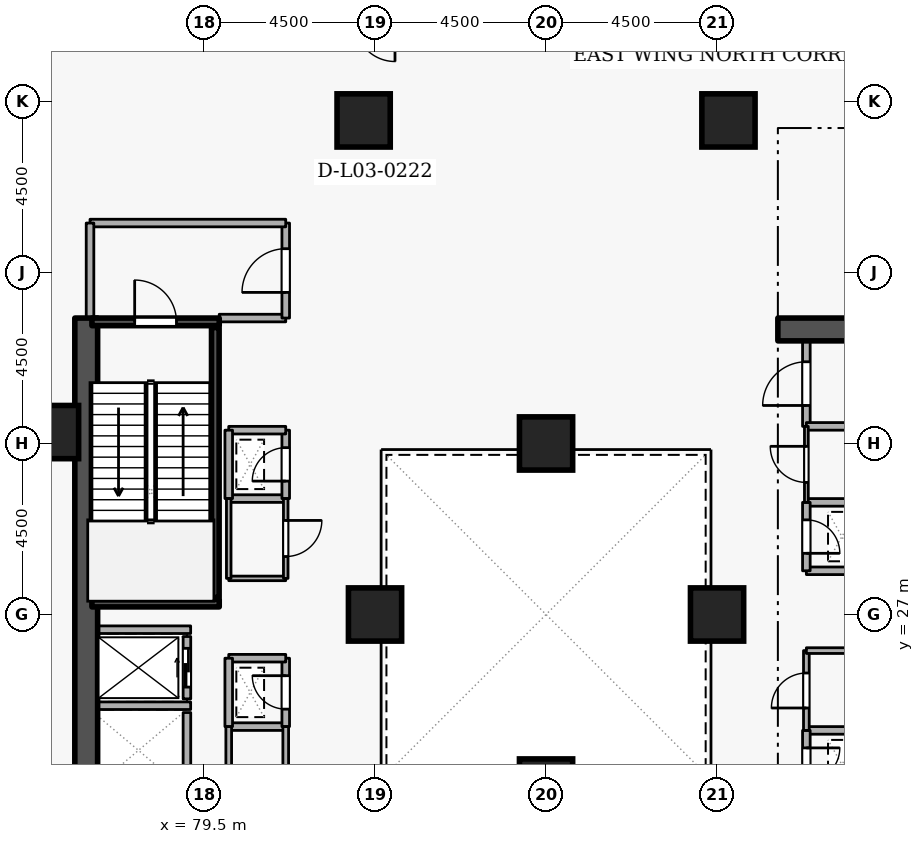
"""IFC4 building model, lengths in metres.
Left out: names, types, materials, properties, quantities, classifications, styles, units other than length and angle.
Written with IfcOpenShell. Run it as: python <this file> out.ifc"""

import sys

from ifc_helpers import new_model, si_unit, direction, frame, frame_2d, origin, origin_2d, place, context, subcontext, project, spatial, rectangle, extrude, element, fill, save


model = new_model("IFC4")
c1 = context("Model", 3, precision=1e-05, world=origin(), true_north=direction((0.0, 1.0)))
c2 = subcontext(c1, "Body", "Model", "MODEL_VIEW")
j1 = project(units=[si_unit("LENGTHUNIT", "METRE"), si_unit("PLANEANGLEUNIT", "RADIAN")], contexts=[c1])
p1 = place(None, origin())
s1 = spatial("IfcSite", under=j1, at=p1, CompositionType="ELEMENT")
p2 = place(p1, origin())
s2 = spatial("IfcBuilding", under=s1, at=p2, CompositionType="ELEMENT")
p3 = place(p2, frame((0.0, 0.0, 14.1)))
s3 = spatial("IfcBuildingStorey", under=s2, at=p3, CompositionType="ELEMENT", Elevation=14.1)
p4 = place(p3, frame((94.6, 34.5, 0.0), z_axis=(0.0, 0.0, 1.0), x_axis=(1.0, 0.0, 0.0)))
e1 = element("IfcWall", 1, at=p4, inside=s3, PredefinedType="SHEAR", context=c2, shape_type="SweptSolid", body=[
    extrude(rectangle(XDim=5.7, YDim=0.6, at=frame_2d((2.85, 0.0))), origin(), (0.0, 0.0, 1.0), 4.5),
])
p5 = place(p3, frame((76.4, 19.2, 0.0), z_axis=(0.0, 0.0, 1.0), x_axis=(0.0, 1.0, 0.0)))
e2 = element("IfcWall", 2, at=p5, inside=s3, PredefinedType="SHEAR", context=c2, shape_type="SweptSolid", body=[
    extrude(rectangle(XDim=15.6, YDim=0.6, at=frame_2d((7.8, 0.0))), origin(), (0.0, 0.0, 1.0), 4.5),
])
for number, where, z_axis, x_axis in (
    (3, (93.3, 40.0, 0.0), (0.0, 0.0, 1.0), (1.0, 0.0, 0.0)),
    (4, (83.7, 40.0, 0.0), (0.0, 0.0, 1.0), (1.0, 0.0, 0.0)),
    (5, (75.5, 31.8, 0.0), (0.0, 0.0, 1.0), (1.0, 0.0, 0.0)),
    (6, (93.0, 27.0, 0.0), (0.0, 0.0, 1.0), (1.0, 0.0, 0.0)),
    (7, (84.0, 27.0, 0.0), (0.0, 0.0, 1.0), (1.0, 0.0, 0.0)),
    (8, (88.5, 22.5, 0.0), (0.0, 0.0, 1.0), (1.0, 0.0, 0.0)),
    (9, (88.5, 31.5, 0.0), (0.0, 0.0, 1.0), (1.0, 0.0, 0.0)),
):
    element("IfcColumn", number, at=place(p3, frame(where, z_axis=z_axis, x_axis=x_axis)), inside=s3, PredefinedType="COLUMN", context=c2, shape_type="SweptSolid", body=[
        extrude(rectangle(XDim=1.4, YDim=1.4, at=origin_2d()), origin(), (0.0, 0.0, 1.0), 4.5),
    ])
p6 = place(p3, frame((79.05, 24.78, 0.0), z_axis=(0.0, 0.0, 1.0), x_axis=(0.0, 1.0, 0.0)))
e10 = element("IfcWall", 10, at=p6, inside=s3, PredefinedType="STANDARD", context=c2, shape_type="SweptSolid", body=[
    extrude(rectangle(XDim=1.64, YDim=0.2, at=frame_2d((0.82, 0.0))), origin(), (0.0, 0.0, 1.0), 4.16),
])
p7 = place(p6, frame((0.31, 0.0, 0.0)))
e11 = element("IfcOpeningElement", 11, at=p7, cuts=e10, PredefinedType="OPENING", context=c2, shape_type="SweptSolid", body=[
    extrude(rectangle(XDim=1.02, YDim=2.06, at=frame_2d((0.51, 1.03))), frame((0.0, 0.11, 0.0), z_axis=(0.0, -1.0, 0.0), x_axis=(1.0, 0.0, 0.0)), (0.0, 0.0, 1.0), 0.22),
])
p8 = place(p3, frame((79.05, 22.43, 0.0), z_axis=(0.0, 0.0, 1.0), x_axis=(0.0, 1.0, 0.0)))
e12 = element("IfcWall", 12, at=p8, inside=s3, PredefinedType="STANDARD", context=c2, shape_type="SweptSolid", body=[
    extrude(rectangle(XDim=1.99, YDim=0.2, at=frame_2d((0.995, 0.0))), origin(), (0.0, 0.0, 1.0), 4.16),
])
for number, where, z_axis, x_axis in (
    (13, (76.712, 26.6, 0.0), (0.0, 0.0, 1.0), (1.0, 0.0, 0.0)),
    (14, (76.712, 24.6, 0.0), (0.0, 0.0, 1.0), (1.0, 0.0, 0.0)),
):
    element("IfcWall", number, at=place(p3, frame(where, z_axis=z_axis, x_axis=x_axis)), inside=s3, PredefinedType="STANDARD", context=c2, shape_type="SweptSolid", body=[
        extrude(rectangle(XDim=2.436, YDim=0.2, at=frame_2d((1.218, 0.0))), origin(), (0.0, 0.0, 1.0), 4.16),
    ])
p9 = place(p3, frame((76.55, 34.7, 0.0), z_axis=(0.0, 0.0, 1.0), x_axis=(1.0, 0.0, 0.0)))
e15 = element("IfcWall", 15, at=p9, inside=s3, PredefinedType="SHEAR", context=c2, shape_type="SweptSolid", body=[
    extrude(rectangle(XDim=3.35, YDim=0.2, at=frame_2d((1.675, 0.0))), origin(), (0.0, 0.0, 1.0), 4.5),
])
p10 = place(p9, frame((1.125, 0.0, 0.0)))
e16 = element("IfcOpeningElement", 16, at=p10, cuts=e15, PredefinedType="OPENING", context=c2, shape_type="SweptSolid", body=[
    extrude(rectangle(XDim=1.1, YDim=2.1, at=frame_2d((0.55, 1.05))), frame((0.0, 0.11, 0.0), z_axis=(0.0, -1.0, 0.0), x_axis=(1.0, 0.0, 0.0)), (0.0, 0.0, 1.0), 0.22),
])
p11 = place(p3, frame((79.9, 27.3, 0.0), z_axis=(0.0, 0.0, 1.0), x_axis=(-1.0, 0.0, 0.0)))
e17 = element("IfcWall", 17, at=p11, inside=s3, PredefinedType="SHEAR", context=c2, shape_type="SweptSolid", body=[
    extrude(rectangle(XDim=3.35, YDim=0.2, at=frame_2d((1.675, 0.0))), origin(), (0.0, 0.0, 1.0), 4.5),
])
p12 = place(p3, frame((79.797, 27.45, 0.0), z_axis=(0.0, 0.0, 1.0), x_axis=(0.0, 1.0, 0.0)))
e18 = element("IfcWall", 18, at=p12, inside=s3, PredefinedType="SHEAR", context=c2, shape_type="SweptSolid", body=[
    extrude(rectangle(XDim=7.1, YDim=0.2, at=frame_2d((3.55, 0.0))), origin(), (0.0, 0.0, 1.0), 4.5),
])
p13 = place(p3, frame((79.9, 34.8, 0.0), z_axis=(0.0, 0.0, 1.0), x_axis=(1.0, 0.0, 0.0)))
e19 = element("IfcWall", 19, at=p13, inside=s3, PredefinedType="STANDARD", context=c2, shape_type="SweptSolid", body=[
    extrude(rectangle(XDim=1.75, YDim=0.2, at=frame_2d((0.875, 0.0))), origin(), (0.0, 0.0, 1.0), 3.365),
])
p14 = place(p3, frame((81.65, 34.8, 0.0), z_axis=(0.0, 0.0, 1.0), x_axis=(0.0, 1.0, 0.0)))
e20 = element("IfcWall", 20, at=p14, inside=s3, PredefinedType="STANDARD", context=c2, shape_type="SweptSolid", body=[
    extrude(rectangle(XDim=2.5, YDim=0.2, at=frame_2d((1.25, 0.0))), origin(), (0.0, 0.0, 1.0), 4.16),
])
p15 = place(p14, frame((0.675, 0.0, 0.0)))
e21 = element("IfcOpeningElement", 21, at=p15, cuts=e20, PredefinedType="OPENING", context=c2, shape_type="SweptSolid", body=[
    extrude(rectangle(XDim=1.15, YDim=2.1, at=frame_2d((0.575, 1.05))), frame((0.0, 0.11, 0.0), z_axis=(0.0, -1.0, 0.0), x_axis=(1.0, 0.0, 0.0)), (0.0, 0.0, 1.0), 0.22),
])
p16 = place(p3, frame((81.65, 37.3, 0.0), z_axis=(0.0, 0.0, 1.0), x_axis=(-1.0, 0.0, 0.0)))
e22 = element("IfcWall", 22, at=p16, inside=s3, PredefinedType="STANDARD", context=c2, shape_type="SweptSolid", body=[
    extrude(rectangle(XDim=5.15, YDim=0.2, at=frame_2d((2.575, 0.0))), origin(), (0.0, 0.0, 1.0), 4.16),
])
p17 = place(p3, frame((76.5, 37.3, 0.0), z_axis=(0.0, 0.0, 1.0), x_axis=(0.0, -1.0, 0.0)))
e23 = element("IfcWall", 23, at=p17, inside=s3, PredefinedType="STANDARD", context=c2, shape_type="SweptSolid", body=[
    extrude(rectangle(XDim=2.5, YDim=0.2, at=frame_2d((1.25, 0.0))), origin(), (0.0, 0.0, 1.0), 4.16),
])
for number, where, z_axis, x_axis in (
    (24, (95.35, 28.15, 0.0), (0.0, 0.0, 1.0), (1.0, 0.0, 0.0)),
    (25, (96.85, 29.95, 0.0), (0.0, 0.0, 1.0), (-1.0, 0.0, 0.0)),
):
    element("IfcWall", number, at=place(p3, frame(where, z_axis=z_axis, x_axis=x_axis)), inside=s3, PredefinedType="STANDARD", context=c2, shape_type="SweptSolid", body=[
        extrude(rectangle(XDim=1.5, YDim=0.2, at=frame_2d((0.75, 0.0))), origin(), (0.0, 0.0, 1.0), 4.16),
    ])
p18 = place(p3, frame((95.35, 29.95, 0.0), z_axis=(0.0, 0.0, 1.0), x_axis=(0.0, -1.0, 0.0)))
e26 = element("IfcWall", 26, at=p18, inside=s3, PredefinedType="STANDARD", context=c2, shape_type="SweptSolid", body=[
    extrude(rectangle(XDim=1.8, YDim=0.2, at=frame_2d((0.9, 0.0))), origin(), (0.0, 0.0, 1.0), 4.16),
])
p19 = place(p18, frame((0.46, 0.0, 0.0)))
e27 = element("IfcOpeningElement", 27, at=p19, cuts=e26, PredefinedType="OPENING", context=c2, shape_type="SweptSolid", body=[
    extrude(rectangle(XDim=0.88, YDim=2.04, at=frame_2d((0.44, 1.02))), frame((0.0, 0.11, 0.0), z_axis=(0.0, -1.0, 0.0), x_axis=(1.0, 0.0, 0.0)), (0.0, 0.0, 1.0), 0.22),
])
p20 = place(p3, frame((96.85, 23.95, 0.0), z_axis=(0.0, 0.0, 1.0), x_axis=(-1.0, 0.0, 0.0)))
e28 = element("IfcWall", 28, at=p20, inside=s3, PredefinedType="STANDARD", context=c2, shape_type="SweptSolid", body=[
    extrude(rectangle(XDim=1.5, YDim=0.2, at=frame_2d((0.75, 0.0))), origin(), (0.0, 0.0, 1.0), 4.16),
])
p21 = place(p3, frame((95.35, 23.95, 0.0), z_axis=(0.0, 0.0, 1.0), x_axis=(0.0, -1.0, 0.0)))
e29 = element("IfcWall", 29, at=p21, inside=s3, PredefinedType="STANDARD", context=c2, shape_type="SweptSolid", body=[
    extrude(rectangle(XDim=1.8, YDim=0.2, at=frame_2d((0.9, 0.0))), origin(), (0.0, 0.0, 1.0), 4.16),
])
p22 = place(p21, frame((0.46, 0.0, 0.0)))
e30 = element("IfcOpeningElement", 30, at=p22, cuts=e29, PredefinedType="OPENING", context=c2, shape_type="SweptSolid", body=[
    extrude(rectangle(XDim=0.88, YDim=2.04, at=frame_2d((0.44, 1.02))), frame((0.0, 0.11, 0.0), z_axis=(0.0, -1.0, 0.0), x_axis=(1.0, 0.0, 0.0)), (0.0, 0.0, 1.0), 0.22),
])
p23 = place(p3, frame((80.15, 24.05, 0.0), z_axis=(0.0, 0.0, 1.0), x_axis=(1.0, 0.0, 0.0)))
e31 = element("IfcWall", 31, at=p23, inside=s3, PredefinedType="STANDARD", context=c2, shape_type="SweptSolid", body=[
    extrude(rectangle(XDim=1.5, YDim=0.2, at=frame_2d((0.75, 0.0))), origin(), (0.0, 0.0, 1.0), 4.16),
])
p24 = place(p3, frame((81.65, 24.05, 0.0), z_axis=(0.0, 0.0, 1.0), x_axis=(0.0, 1.0, 0.0)))
e32 = element("IfcWall", 32, at=p24, inside=s3, PredefinedType="STANDARD", context=c2, shape_type="SweptSolid", body=[
    extrude(rectangle(XDim=1.8, YDim=0.2, at=frame_2d((0.9, 0.0))), origin(), (0.0, 0.0, 1.0), 4.16),
])
p25 = place(p24, frame((0.46, 0.0, 0.0)))
e33 = element("IfcOpeningElement", 33, at=p25, cuts=e32, PredefinedType="OPENING", context=c2, shape_type="SweptSolid", body=[
    extrude(rectangle(XDim=0.88, YDim=2.04, at=frame_2d((0.44, 1.02))), frame((0.0, 0.11, 0.0), z_axis=(0.0, -1.0, 0.0), x_axis=(1.0, 0.0, 0.0)), (0.0, 0.0, 1.0), 0.22),
])
p26 = place(p3, frame((81.65, 25.85, 0.0), z_axis=(0.0, 0.0, 1.0), x_axis=(-1.0, 0.0, 0.0)))
e34 = element("IfcWall", 34, at=p26, inside=s3, PredefinedType="STANDARD", context=c2, shape_type="SweptSolid", body=[
    extrude(rectangle(XDim=1.5, YDim=0.2, at=frame_2d((0.75, 0.0))), origin(), (0.0, 0.0, 1.0), 4.16),
])
p27 = place(p3, frame((80.15, 25.85, 0.0), z_axis=(0.0, 0.0, 1.0), x_axis=(0.0, -1.0, 0.0)))
e35 = element("IfcWall", 35, at=p27, inside=s3, PredefinedType="STANDARD", context=c2, shape_type="SweptSolid", body=[
    extrude(rectangle(XDim=1.8, YDim=0.2, at=frame_2d((0.9, 0.0))), origin(), (0.0, 0.0, 1.0), 4.16),
])
p28 = place(p3, frame((80.15, 30.05, 0.0), z_axis=(0.0, 0.0, 1.0), x_axis=(1.0, 0.0, 0.0)))
e36 = element("IfcWall", 36, at=p28, inside=s3, PredefinedType="STANDARD", context=c2, shape_type="SweptSolid", body=[
    extrude(rectangle(XDim=1.5, YDim=0.2, at=frame_2d((0.75, 0.0))), origin(), (0.0, 0.0, 1.0), 4.16),
])
p29 = place(p3, frame((81.65, 30.05, 0.0), z_axis=(0.0, 0.0, 1.0), x_axis=(0.0, 1.0, 0.0)))
e37 = element("IfcWall", 37, at=p29, inside=s3, PredefinedType="STANDARD", context=c2, shape_type="SweptSolid", body=[
    extrude(rectangle(XDim=1.8, YDim=0.2, at=frame_2d((0.9, 0.0))), origin(), (0.0, 0.0, 1.0), 4.16),
])
p30 = place(p29, frame((0.46, 0.0, 0.0)))
e38 = element("IfcOpeningElement", 38, at=p30, cuts=e37, PredefinedType="OPENING", context=c2, shape_type="SweptSolid", body=[
    extrude(rectangle(XDim=0.88, YDim=2.04, at=frame_2d((0.44, 1.02))), frame((0.0, 0.11, 0.0), z_axis=(0.0, -1.0, 0.0), x_axis=(1.0, 0.0, 0.0)), (0.0, 0.0, 1.0), 0.22),
])
p31 = place(p3, frame((81.65, 31.85, 0.0), z_axis=(0.0, 0.0, 1.0), x_axis=(-1.0, 0.0, 0.0)))
e39 = element("IfcWall", 39, at=p31, inside=s3, PredefinedType="STANDARD", context=c2, shape_type="SweptSolid", body=[
    extrude(rectangle(XDim=1.5, YDim=0.2, at=frame_2d((0.75, 0.0))), origin(), (0.0, 0.0, 1.0), 4.16),
])
p32 = place(p3, frame((80.15, 31.85, 0.0), z_axis=(0.0, 0.0, 1.0), x_axis=(0.0, -1.0, 0.0)))
e40 = element("IfcWall", 40, at=p32, inside=s3, PredefinedType="STANDARD", context=c2, shape_type="SweptSolid", body=[
    extrude(rectangle(XDim=1.8, YDim=0.2, at=frame_2d((0.9, 0.0))), origin(), (0.0, 0.0, 1.0), 4.16),
])
p33 = place(p3, frame((95.35, 31.95, 0.0), z_axis=(0.0, 0.0, 1.0), x_axis=(0.0, 1.0, 0.0)))
e41 = element("IfcWall", 41, at=p33, inside=s3, PredefinedType="STANDARD", context=c2, shape_type="SweptSolid", body=[
    extrude(rectangle(XDim=2.25, YDim=0.2, at=frame_2d((1.125, 0.0))), origin(), (0.0, 0.0, 1.0), 4.16),
])
p34 = place(p33, frame((0.55, 0.0, 0.0)))
e42 = element("IfcOpeningElement", 42, at=p34, cuts=e41, PredefinedType="OPENING", context=c2, shape_type="SweptSolid", body=[
    extrude(rectangle(XDim=1.15, YDim=2.1, at=frame_2d((0.575, 1.05))), frame((0.0, 0.11, 0.0), z_axis=(0.0, -1.0, 0.0), x_axis=(1.0, 0.0, 0.0)), (0.0, 0.0, 1.0), 0.22),
])
p35 = place(p3, frame((96.85, 31.95, 0.0), z_axis=(0.0, 0.0, 1.0), x_axis=(-1.0, 0.0, 0.0)))
e43 = element("IfcWall", 43, at=p35, inside=s3, PredefinedType="STANDARD", context=c2, shape_type="SweptSolid", body=[
    extrude(rectangle(XDim=1.5, YDim=0.2, at=frame_2d((0.75, 0.0))), origin(), (0.0, 0.0, 1.0), 4.16),
])
p36 = place(p3, frame((95.35, 23.95, 0.0), z_axis=(0.0, 0.0, 1.0), x_axis=(0.0, 1.0, 0.0)))
e44 = element("IfcWall", 44, at=p36, inside=s3, PredefinedType="PARTITIONING", context=c2, shape_type="SweptSolid", body=[
    extrude(rectangle(XDim=2.1, YDim=0.15, at=frame_2d((1.05, 0.0))), origin(), (0.0, 0.0, 1.0), 4.16),
])
p37 = place(p36, frame((0.59, 0.0, 0.0)))
e45 = element("IfcOpeningElement", 45, at=p37, cuts=e44, PredefinedType="OPENING", context=c2, shape_type="SweptSolid", body=[
    extrude(rectangle(XDim=0.92, YDim=2.08, at=frame_2d((0.46, 1.04))), frame((0.0, 0.085, 0.0), z_axis=(0.0, -1.0, 0.0), x_axis=(1.0, 0.0, 0.0)), (0.0, 0.0, 1.0), 0.17),
])
p38 = place(p3, frame((95.35, 26.05, 0.0), z_axis=(0.0, 0.0, 1.0), x_axis=(1.0, 0.0, 0.0)))
e46 = element("IfcWall", 46, at=p38, inside=s3, PredefinedType="PARTITIONING", context=c2, shape_type="SweptSolid", body=[
    extrude(rectangle(XDim=1.5, YDim=0.15, at=frame_2d((0.75, 0.0))), origin(), (0.0, 0.0, 1.0), 4.16),
])
p39 = place(p3, frame((95.35, 29.95, 0.0), z_axis=(0.0, 0.0, 1.0), x_axis=(0.0, 1.0, 0.0)))
e47 = element("IfcWall", 47, at=p39, inside=s3, PredefinedType="PARTITIONING", context=c2, shape_type="SweptSolid", body=[
    extrude(rectangle(XDim=2.0, YDim=0.1, at=frame_2d((1.0, 0.0))), origin(), (0.0, 0.0, 1.0), 4.16),
])
p40 = place(p39, frame((0.525, 0.0, 0.0)))
e48 = element("IfcOpeningElement", 48, at=p40, cuts=e47, PredefinedType="OPENING", context=c2, shape_type="SweptSolid", body=[
    extrude(rectangle(XDim=0.95, YDim=2.1, at=frame_2d((0.475, 1.05))), frame((0.0, 0.06, 0.0), z_axis=(0.0, -1.0, 0.0), x_axis=(1.0, 0.0, 0.0)), (0.0, 0.0, 1.0), 0.12),
])
p41 = place(p3, frame((80.15, 19.8, 0.0), z_axis=(0.0, 0.0, 1.0), x_axis=(0.0, 1.0, 0.0)))
e49 = element("IfcWall", 49, at=p41, inside=s3, PredefinedType="PARTITIONING", context=c2, shape_type="SweptSolid", body=[
    extrude(rectangle(XDim=4.25, YDim=0.15, at=frame_2d((2.125, 0.0))), origin(), (0.0, 0.0, 1.0), 4.16),
])
p42 = place(p3, frame((81.65, 24.05, 0.0), z_axis=(0.0, 0.0, 1.0), x_axis=(0.0, -1.0, 0.0)))
e50 = element("IfcWall", 50, at=p42, inside=s3, PredefinedType="PARTITIONING", context=c2, shape_type="SweptSolid", body=[
    extrude(rectangle(XDim=4.25, YDim=0.15, at=frame_2d((2.125, 0.0))), origin(), (0.0, 0.0, 1.0), 4.16),
])
p43 = place(p42, frame((1.665, 0.0, 0.0)))
e51 = element("IfcOpeningElement", 51, at=p43, cuts=e50, PredefinedType="OPENING", context=c2, shape_type="SweptSolid", body=[
    extrude(rectangle(XDim=0.92, YDim=2.08, at=frame_2d((0.46, 1.04))), frame((0.0, 0.085, 0.0), z_axis=(0.0, -1.0, 0.0), x_axis=(1.0, 0.0, 0.0)), (0.0, 0.0, 1.0), 0.17),
])
p44 = place(p3, frame((81.65, 27.95, 0.0), z_axis=(0.0, 0.0, 1.0), x_axis=(-1.0, 0.0, 0.0)))
e52 = element("IfcWall", 52, at=p44, inside=s3, PredefinedType="PARTITIONING", context=c2, shape_type="SweptSolid", body=[
    extrude(rectangle(XDim=1.5, YDim=0.12, at=frame_2d((0.75, 0.0))), origin(), (0.0, 0.0, 1.0), 4.16),
])
p45 = place(p3, frame((80.15, 27.95, 0.0), z_axis=(0.0, 0.0, 1.0), x_axis=(0.0, 1.0, 0.0)))
e53 = element("IfcWall", 53, at=p45, inside=s3, PredefinedType="PARTITIONING", context=c2, shape_type="SweptSolid", body=[
    extrude(rectangle(XDim=2.1, YDim=0.12, at=frame_2d((1.05, 0.0))), origin(), (0.0, 0.0, 1.0), 4.16),
])
p46 = place(p3, frame((81.65, 30.05, 0.0), z_axis=(0.0, 0.0, 1.0), x_axis=(0.0, -1.0, 0.0)))
e54 = element("IfcWall", 54, at=p46, inside=s3, PredefinedType="PARTITIONING", context=c2, shape_type="SweptSolid", body=[
    extrude(rectangle(XDim=2.1, YDim=0.12, at=frame_2d((1.05, 0.0))), origin(), (0.0, 0.0, 1.0), 4.16),
])
p47 = place(p46, frame((0.575, 0.0, 0.0)))
e55 = element("IfcOpeningElement", 55, at=p47, cuts=e54, PredefinedType="OPENING", context=c2, shape_type="SweptSolid", body=[
    extrude(rectangle(XDim=0.95, YDim=2.1, at=frame_2d((0.475, 1.05))), frame((0.0, 0.07, 0.0), z_axis=(0.0, -1.0, 0.0), x_axis=(1.0, 0.0, 0.0)), (0.0, 0.0, 1.0), 0.14),
])
p48 = place(p7, origin())
e56 = element("IfcDoor", 56, at=p48, inside=s3, OperationType="SLIDING_TO_LEFT", PredefinedType="DOOR", context=c2, shape_type="SweptSolid", body=[
    extrude(rectangle(XDim=1.02, YDim=2.06, at=frame_2d((0.51, 1.03))), frame((0.0, 0.025, 0.0), z_axis=(0.0, -1.0, 0.0), x_axis=(1.0, 0.0, 0.0)), (0.0, 0.0, 1.0), 0.05),
])
fill(e11, e56)
p49 = place(p10, origin())
e57 = element("IfcDoor", 57, at=p49, inside=s3, OperationType="SINGLE_SWING_LEFT", PredefinedType="DOOR", context=c2, shape_type="SweptSolid", body=[
    extrude(rectangle(XDim=1.1, YDim=2.1, at=frame_2d((0.55, 1.05))), frame((0.0, 0.025, 0.0), z_axis=(0.0, -1.0, 0.0), x_axis=(1.0, 0.0, 0.0)), (0.0, 0.0, 1.0), 0.05),
])
fill(e16, e57)
p50 = place(p15, origin())
e58 = element("IfcDoor", 58, at=p50, inside=s3, OperationType="SINGLE_SWING_LEFT", PredefinedType="DOOR", context=c2, shape_type="SweptSolid", body=[
    extrude(rectangle(XDim=1.15, YDim=2.1, at=frame_2d((0.575, 1.05))), frame((0.0, 0.025, 0.0), z_axis=(0.0, -1.0, 0.0), x_axis=(1.0, 0.0, 0.0)), (0.0, 0.0, 1.0), 0.05),
])
fill(e21, e58)
p51 = place(p19, origin())
e59 = element("IfcDoor", 59, at=p51, inside=s3, OperationType="SINGLE_SWING_RIGHT", PredefinedType="DOOR", context=c2, shape_type="SweptSolid", body=[
    extrude(rectangle(XDim=0.88, YDim=2.04, at=frame_2d((0.44, 1.02))), frame((0.0, 0.025, 0.0), z_axis=(0.0, -1.0, 0.0), x_axis=(1.0, 0.0, 0.0)), (0.0, 0.0, 1.0), 0.05),
])
fill(e27, e59)
p52 = place(p22, origin())
e60 = element("IfcDoor", 60, at=p52, inside=s3, OperationType="SINGLE_SWING_LEFT", PredefinedType="DOOR", context=c2, shape_type="SweptSolid", body=[
    extrude(rectangle(XDim=0.88, YDim=2.04, at=frame_2d((0.44, 1.02))), frame((0.0, 0.025, 0.0), z_axis=(0.0, -1.0, 0.0), x_axis=(1.0, 0.0, 0.0)), (0.0, 0.0, 1.0), 0.05),
])
fill(e30, e60)
p53 = place(p25, origin())
e61 = element("IfcDoor", 61, at=p53, inside=s3, OperationType="SINGLE_SWING_RIGHT", PredefinedType="DOOR", context=c2, shape_type="SweptSolid", body=[
    extrude(rectangle(XDim=0.88, YDim=2.04, at=frame_2d((0.44, 1.02))), frame((0.0, 0.025, 0.0), z_axis=(0.0, -1.0, 0.0), x_axis=(1.0, 0.0, 0.0)), (0.0, 0.0, 1.0), 0.05),
])
fill(e33, e61)
p54 = place(p30, origin())
e62 = element("IfcDoor", 62, at=p54, inside=s3, OperationType="SINGLE_SWING_LEFT", PredefinedType="DOOR", context=c2, shape_type="SweptSolid", body=[
    extrude(rectangle(XDim=0.88, YDim=2.04, at=frame_2d((0.44, 1.02))), frame((0.0, 0.025, 0.0), z_axis=(0.0, -1.0, 0.0), x_axis=(1.0, 0.0, 0.0)), (0.0, 0.0, 1.0), 0.05),
])
fill(e38, e62)
p55 = place(p37, origin())
e63 = element("IfcDoor", 63, at=p55, inside=s3, OperationType="SINGLE_SWING_LEFT", PredefinedType="DOOR", context=c2, shape_type="SweptSolid", body=[
    extrude(rectangle(XDim=0.92, YDim=2.08, at=frame_2d((0.46, 1.04))), frame((0.0, 0.025, 0.0), z_axis=(0.0, -1.0, 0.0), x_axis=(1.0, 0.0, 0.0)), (0.0, 0.0, 1.0), 0.05),
])
fill(e45, e63)
p56 = place(p40, origin())
e64 = element("IfcDoor", 64, at=p56, inside=s3, OperationType="SINGLE_SWING_RIGHT", PredefinedType="DOOR", context=c2, shape_type="SweptSolid", body=[
    extrude(rectangle(XDim=0.95, YDim=2.1, at=frame_2d((0.475, 1.05))), frame((0.0, 0.025, 0.0), z_axis=(0.0, -1.0, 0.0), x_axis=(1.0, 0.0, 0.0)), (0.0, 0.0, 1.0), 0.05),
])
fill(e48, e64)
p57 = place(p34, origin())
e65 = element("IfcDoor", 65, at=p57, inside=s3, OperationType="SINGLE_SWING_LEFT", PredefinedType="DOOR", context=c2, shape_type="SweptSolid", body=[
    extrude(rectangle(XDim=1.15, YDim=2.1, at=frame_2d((0.575, 1.05))), frame((0.0, 0.025, 0.0), z_axis=(0.0, -1.0, 0.0), x_axis=(1.0, 0.0, 0.0)), (0.0, 0.0, 1.0), 0.05),
])
fill(e42, e65)
p58 = place(p47, origin())
e66 = element("IfcDoor", 66, at=p58, inside=s3, OperationType="SINGLE_SWING_LEFT", PredefinedType="DOOR", context=c2, shape_type="SweptSolid", body=[
    extrude(rectangle(XDim=0.95, YDim=2.1, at=frame_2d((0.475, 1.05))), frame((0.0, 0.025, 0.0), z_axis=(0.0, -1.0, 0.0), x_axis=(1.0, 0.0, 0.0)), (0.0, 0.0, 1.0), 0.05),
])
fill(e55, e66)
save(model, sys.argv[1])
